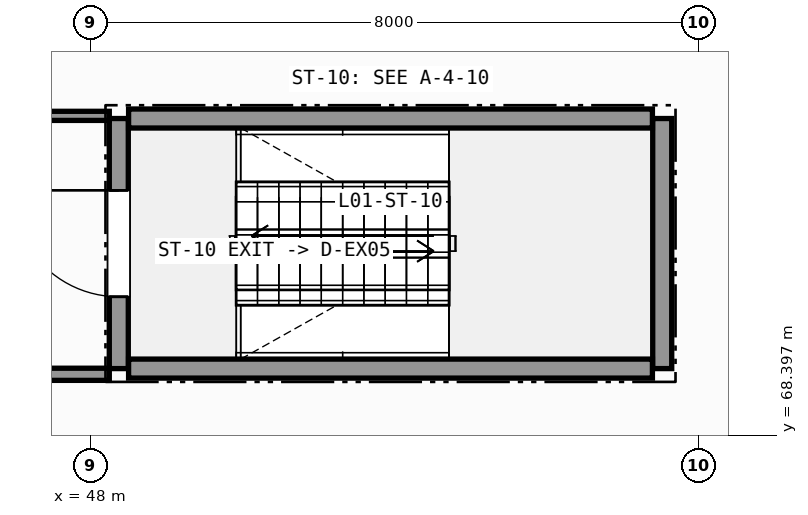
"""IFC4 building model, lengths in metres.
Left out: names, types, materials, properties, quantities, classifications, styles, units other than length and angle.
Written with IfcOpenShell. Run it as: python <this file> out.ifc"""

import sys

from ifc_helpers import new_model, si_unit, direction, frame, frame_2d, origin, place, context, subcontext, project, spatial, rectangle, extrude, element, fill, save


model = new_model("IFC4")
c1 = context("Model", 3, precision=1e-05, world=origin(), true_north=direction((0.0, 1.0)))
c2 = subcontext(c1, "Body", "Model", "MODEL_VIEW")
j1 = project(units=[si_unit("LENGTHUNIT", "METRE"), si_unit("PLANEANGLEUNIT", "RADIAN")], contexts=[c1])
p1 = place(None, origin())
s1 = spatial("IfcSite", under=j1, at=p1, CompositionType="ELEMENT")
p2 = place(p1, origin())
s2 = spatial("IfcBuilding", under=s1, at=p2, CompositionType="ELEMENT")
p3 = place(p2, origin())
s3 = spatial("IfcBuildingStorey", under=s2, at=p3, CompositionType="ELEMENT", Elevation=0.0)
p4 = place(p3, frame((48.375, 69.275, 0.0), z_axis=(0.0, 0.0, 1.0), x_axis=(0.0, 1.0, 0.0)))
e1 = element("IfcWall", 1, at=p4, inside=s3, PredefinedType="SHEAR", context=c2, shape_type="SweptSolid", body=[
    extrude(rectangle(XDim=3.29, YDim=0.25, at=frame_2d((1.645, 0.0))), origin(), (0.0, 0.0, 1.0), 7.54),
])
p5 = place(p4, frame((0.945, 0.0, 0.0)))
e2 = element("IfcOpeningElement", 2, at=p5, cuts=e1, PredefinedType="OPENING", context=c2, shape_type="SweptSolid", body=[
    extrude(rectangle(XDim=1.4, YDim=2.2, at=frame_2d((0.7, 1.1))), frame((0.0, 0.135, 0.0), z_axis=(0.0, -1.0, 0.0), x_axis=(1.0, 0.0, 0.0)), (0.0, 0.0, 1.0), 0.27),
])
p6 = place(p3, frame((55.525, 69.275, 0.0), z_axis=(0.0, 0.0, 1.0), x_axis=(0.0, 1.0, 0.0)))
e3 = element("IfcWall", 3, at=p6, inside=s3, PredefinedType="SHEAR", context=c2, shape_type="SweptSolid", body=[
    extrude(rectangle(XDim=3.29, YDim=0.25, at=frame_2d((1.645, 0.0))), origin(), (0.0, 0.0, 1.0), 7.54),
])
for number, where, z_axis, x_axis in (
    (4, (48.504, 69.275, 0.0), (0.0, 0.0, 1.0), (1.0, 0.0, 0.0)),
    (5, (48.504, 72.565, 0.0), (0.0, 0.0, 1.0), (1.0, 0.0, 0.0)),
):
    element("IfcWall", number, at=place(p3, frame(where, z_axis=z_axis, x_axis=x_axis)), inside=s3, PredefinedType="SHEAR", context=c2, shape_type="SweptSolid", body=[
        extrude(rectangle(XDim=6.892, YDim=0.25, at=frame_2d((3.446, 0.0))), origin(), (0.0, 0.0, 1.0), 7.54),
    ])
p7 = place(p3, frame((43.684, 72.6, 0.0), z_axis=(0.0, 0.0, 1.0), x_axis=(1.0, 0.0, 0.0)))
e6 = element("IfcWall", 6, at=p7, inside=s3, PredefinedType="PARTITIONING", context=c2, shape_type="SweptSolid", body=[
    extrude(rectangle(XDim=4.566, YDim=0.12, at=frame_2d((2.283, 0.0))), origin(), (0.0, 0.0, 1.0), 7.54),
])
p8 = place(p7, frame((1.383, 0.0, 0.0)))
e7 = element("IfcOpeningElement", 7, at=p8, cuts=e6, PredefinedType="OPENING", context=c2, shape_type="SweptSolid", body=[
    extrude(rectangle(XDim=1.8, YDim=2.4, at=frame_2d((0.9, 1.2))), frame((0.0, 0.07, 0.0), z_axis=(0.0, -1.0, 0.0), x_axis=(1.0, 0.0, 0.0)), (0.0, 0.0, 1.0), 0.14),
])
p9 = place(p3, frame((43.679, 69.2, 0.0), z_axis=(0.0, 0.0, 1.0), x_axis=(1.0, 0.0, 0.0)))
e8 = element("IfcWall", 8, at=p9, inside=s3, PredefinedType="PARTITIONING", context=c2, shape_type="SweptSolid", body=[
    extrude(rectangle(XDim=4.571, YDim=0.16, at=frame_2d((2.286, 0.0))), origin(), (0.0, 0.0, 1.0), 7.54),
])
p10 = place(p9, frame((1.385, 0.0, 0.0)))
e9 = element("IfcOpeningElement", 9, at=p10, cuts=e8, PredefinedType="OPENING", context=c2, shape_type="SweptSolid", body=[
    extrude(rectangle(XDim=1.8, YDim=2.4, at=frame_2d((0.9, 1.2))), frame((0.0, 0.09, 0.0), z_axis=(0.0, -1.0, 0.0), x_axis=(1.0, 0.0, 0.0)), (0.0, 0.0, 1.0), 0.18),
])
p11 = place(p5, origin())
e10 = element("IfcDoor", 10, at=p11, inside=s3, OperationType="SINGLE_SWING_RIGHT", PredefinedType="DOOR", context=c2, shape_type="SweptSolid", body=[
    extrude(rectangle(XDim=1.4, YDim=2.2, at=frame_2d((0.7, 1.1))), frame((0.0, 0.025, 0.0), z_axis=(0.0, -1.0, 0.0), x_axis=(1.0, 0.0, 0.0)), (0.0, 0.0, 1.0), 0.05),
])
fill(e2, e10)
save(model, sys.argv[1])
